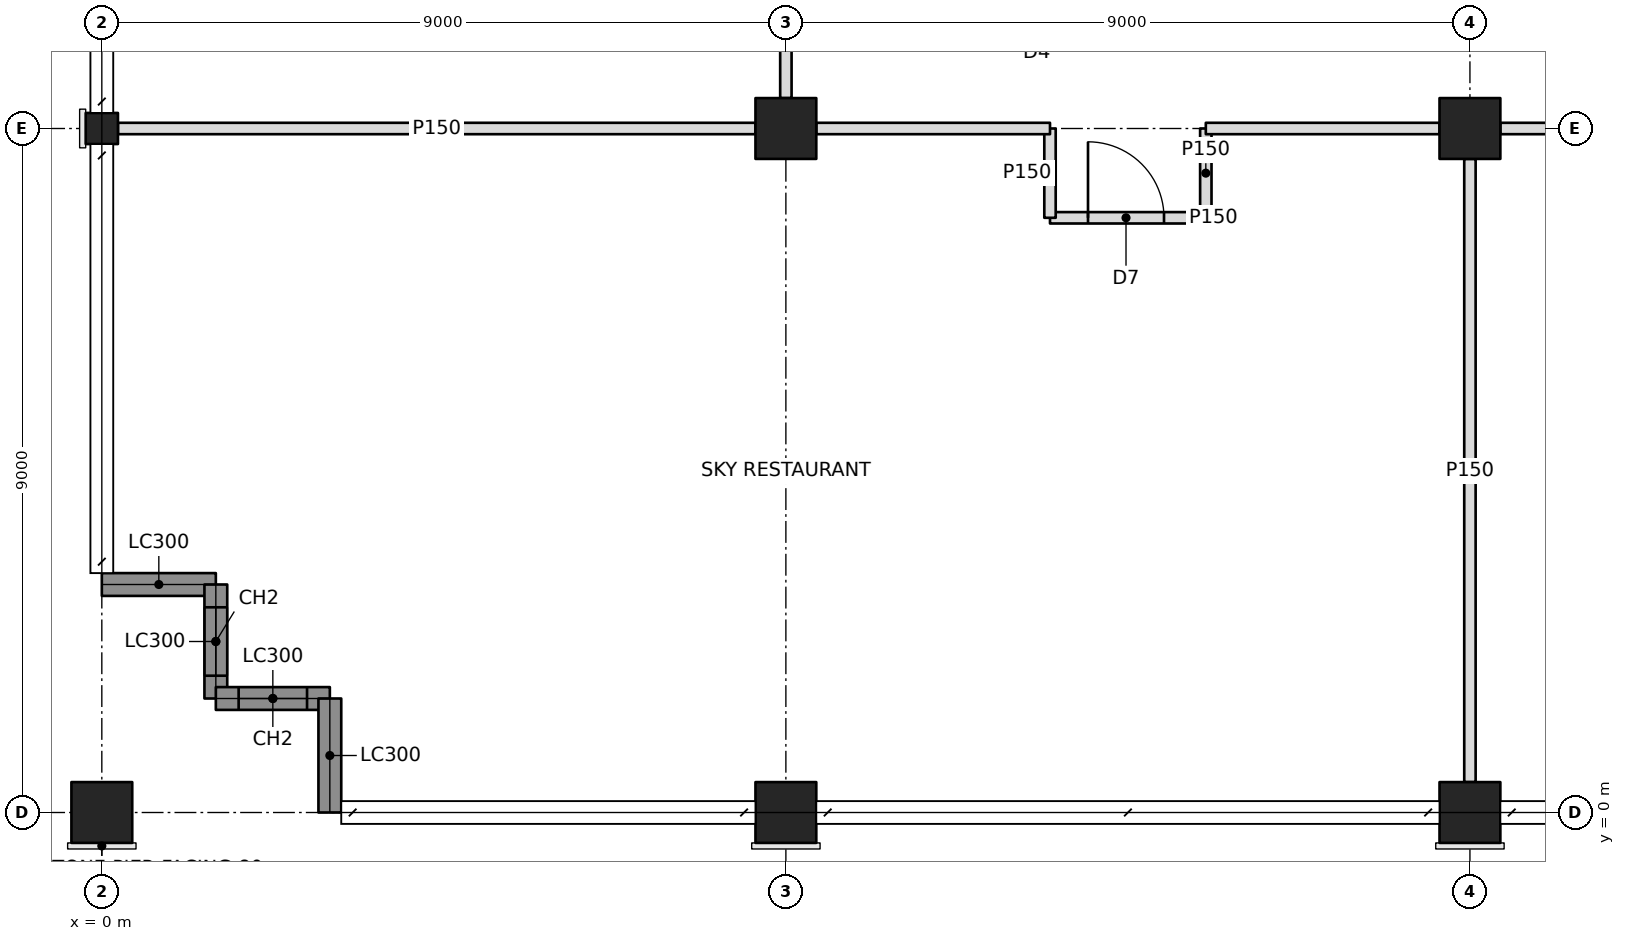
"""IFC4 building model, lengths in metres.
Left out: names, types, materials, properties, quantities, classifications, styles, units other than length and angle.
Written with IfcOpenShell. Run it as: python <this file> out.ifc"""

import sys

from ifc_helpers import new_model, si_unit, direction, frame, frame_2d, origin, origin_with_axes, origin_2d, place, context, subcontext, project, spatial, rectangle, hollow_rectangle, i_section, extrude, element, fill, save


model = new_model("IFC4")
c1 = context("Model", 3, precision=1e-05, world=origin(), true_north=direction((0.0, 1.0)))
c2 = subcontext(c1, "Body", "Model", "MODEL_VIEW")
j1 = project(units=[si_unit("LENGTHUNIT", "METRE"), si_unit("PLANEANGLEUNIT", "RADIAN")], contexts=[c1])
p1 = place(None, origin())
s1 = spatial("IfcSite", under=j1, at=p1, CompositionType="ELEMENT")
p2 = place(p1, origin())
s2 = spatial("IfcBuilding", under=s1, at=p2, CompositionType="ELEMENT")
p3 = place(p2, frame((0.0, 0.0, 269.8)))
s3 = spatial("IfcBuildingStorey", under=s2, at=p3, CompositionType="ELEMENT", Elevation=269.8)
p4 = place(p3, origin_with_axes())
e1 = element("IfcColumn", 1, at=p4, inside=s3, PredefinedType="COLUMN", context=c2, shape_type="SweptSolid", body=[
    extrude(hollow_rectangle(XDim=0.8, YDim=0.8, WallThickness=0.025, at=origin_2d()), origin(), (0.0, 0.0, 1.0), 5.0),
])
p5 = place(p3, frame((0.0, 9.0, 0.0), z_axis=(0.0, 0.0, 1.0), x_axis=(0.0, 1.0, 0.0)))
e2 = element("IfcColumn", 2, at=p5, inside=s3, PredefinedType="COLUMN", context=c2, shape_type="SweptSolid", body=[
    extrude(i_section(OverallWidth=0.409, OverallDepth=0.424, WebThickness=0.033, FlangeThickness=0.052, at=origin_2d()), origin(), (0.0, 0.0, 1.0), 5.0),
])
for number, where, z_axis, x_axis in (
    (3, (9.0, 0.0, 0.0), (0.0, 0.0, 1.0), (1.0, 0.0, 0.0)),
    (4, (9.0, 9.0, 0.0), (0.0, 0.0, 1.0), (1.0, 0.0, 0.0)),
    (5, (18.0, 0.0, 0.0), (0.0, 0.0, 1.0), (1.0, 0.0, 0.0)),
    (6, (18.0, 9.0, 0.0), (0.0, 0.0, 1.0), (1.0, 0.0, 0.0)),
):
    element("IfcColumn", number, at=place(p3, frame(where, z_axis=z_axis, x_axis=x_axis)), inside=s3, PredefinedType="COLUMN", context=c2, shape_type="SweptSolid", body=[
        extrude(hollow_rectangle(XDim=0.8, YDim=0.8, WallThickness=0.025, at=origin_2d()), origin(), (0.0, 0.0, 1.0), 5.0),
    ])
p6 = place(p3, frame((0.0, 3.0, 0.0), z_axis=(0.0, 0.0, 1.0), x_axis=(1.0, 0.0, 0.0)))
e7 = element("IfcWall", 7, at=p6, inside=s3, PredefinedType="SOLIDWALL", context=c2, shape_type="SweptSolid", body=[
    extrude(rectangle(XDim=1.5, YDim=0.3, at=frame_2d((0.75, 0.0))), origin(), (0.0, 0.0, 1.0), 3.97),
])
p7 = place(p3, frame((1.5, 3.0, 0.0), z_axis=(0.0, 0.0, 1.0), x_axis=(0.0, -1.0, 0.0)))
e8 = element("IfcWall", 8, at=p7, inside=s3, PredefinedType="SOLIDWALL", context=c2, shape_type="SweptSolid", body=[
    extrude(rectangle(XDim=1.5, YDim=0.3, at=frame_2d((0.75, 0.0))), origin(), (0.0, 0.0, 1.0), 4.75),
])
p8 = place(p7, frame((0.3, 0.0, 0.6)))
e9 = element("IfcOpeningElement", 9, at=p8, cuts=e8, PredefinedType="OPENING", context=c2, shape_type="SweptSolid", body=[
    extrude(rectangle(XDim=0.9, YDim=2.2, at=frame_2d((0.45, 1.1))), frame((0.0, 0.16, 0.0), z_axis=(0.0, -1.0, 0.0), x_axis=(1.0, 0.0, 0.0)), (0.0, 0.0, 1.0), 0.32),
])
p9 = place(p3, frame((1.5, 1.5, 0.0), z_axis=(0.0, 0.0, 1.0), x_axis=(1.0, 0.0, 0.0)))
e10 = element("IfcWall", 10, at=p9, inside=s3, PredefinedType="SOLIDWALL", context=c2, shape_type="SweptSolid", body=[
    extrude(rectangle(XDim=1.5, YDim=0.3, at=frame_2d((0.75, 0.0))), origin(), (0.0, 0.0, 1.0), 4.142),
])
p10 = place(p9, frame((0.3, 0.0, 0.6)))
e11 = element("IfcOpeningElement", 11, at=p10, cuts=e10, PredefinedType="OPENING", context=c2, shape_type="SweptSolid", body=[
    extrude(rectangle(XDim=0.9, YDim=2.2, at=frame_2d((0.45, 1.1))), frame((0.0, 0.16, 0.0), z_axis=(0.0, -1.0, 0.0), x_axis=(1.0, 0.0, 0.0)), (0.0, 0.0, 1.0), 0.32),
])
p11 = place(p3, frame((3.0, 1.5, 0.0), z_axis=(0.0, 0.0, 1.0), x_axis=(0.0, -1.0, 0.0)))
e12 = element("IfcWall", 12, at=p11, inside=s3, PredefinedType="SOLIDWALL", context=c2, shape_type="SweptSolid", body=[
    extrude(rectangle(XDim=1.5, YDim=0.3, at=frame_2d((0.75, 0.0))), origin(), (0.0, 0.0, 1.0), 3.97),
])
p12 = place(p3, frame((0.212, 9.0, 0.0), z_axis=(0.0, 0.0, 1.0), x_axis=(1.0, 0.0, 0.0)))
e13 = element("IfcWall", 13, at=p12, inside=s3, PredefinedType="PARTITIONING", context=c2, shape_type="SweptSolid", body=[
    extrude(rectangle(XDim=8.388, YDim=0.15, at=frame_2d((4.194, 0.0))), origin(), (0.0, 0.0, 1.0), 3.802),
])
p13 = place(p3, frame((9.4, 9.0, 0.0), z_axis=(0.0, 0.0, 1.0), x_axis=(1.0, 0.0, 0.0)))
e14 = element("IfcWall", 14, at=p13, inside=s3, PredefinedType="PARTITIONING", context=c2, shape_type="SweptSolid", body=[
    extrude(rectangle(XDim=3.075, YDim=0.15, at=frame_2d((1.538, 0.0))), origin(), (0.0, 0.0, 1.0), 3.802),
])
p14 = place(p3, frame((9.0, 13.5, 0.0), z_axis=(0.0, 0.0, 1.0), x_axis=(0.0, -1.0, 0.0)))
e15 = element("IfcWall", 15, at=p14, inside=s3, PredefinedType="PARTITIONING", context=c2, shape_type="SweptSolid", body=[
    extrude(rectangle(XDim=4.1, YDim=0.15, at=frame_2d((2.05, 0.0))), origin(), (0.0, 0.0, 1.0), 3.802),
])
p15 = place(p14, frame((1.5, 0.0, 0.0)))
e16 = element("IfcOpeningElement", 16, at=p15, cuts=e15, PredefinedType="OPENING", context=c2, shape_type="SweptSolid", body=[
    extrude(rectangle(XDim=1.0, YDim=2.1, at=frame_2d((0.5, 1.05))), frame((0.0, 0.085, 0.0), z_axis=(0.0, -1.0, 0.0), x_axis=(1.0, 0.0, 0.0)), (0.0, 0.0, 1.0), 0.17),
])
p16 = place(p3, frame((18.0, 8.6, 0.0), z_axis=(0.0, 0.0, 1.0), x_axis=(0.0, -1.0, 0.0)))
e17 = element("IfcWall", 17, at=p16, inside=s3, PredefinedType="PARTITIONING", context=c2, shape_type="SweptSolid", body=[
    extrude(rectangle(XDim=8.2, YDim=0.15, at=frame_2d((4.1, 0.0))), origin(), (0.0, 0.0, 1.0), 3.802),
])
p17 = place(p3, frame((18.4, 9.0, 0.0), z_axis=(0.0, 0.0, 1.0), x_axis=(1.0, 0.0, 0.0)))
e18 = element("IfcWall", 18, at=p17, inside=s3, PredefinedType="PARTITIONING", context=c2, shape_type="SweptSolid", body=[
    extrude(rectangle(XDim=5.775, YDim=0.15, at=frame_2d((2.888, 0.0))), origin(), (0.0, 0.0, 1.0), 3.802),
])
p18 = place(p3, frame((14.525, 9.0, 0.0), z_axis=(0.0, 0.0, 1.0), x_axis=(1.0, 0.0, 0.0)))
e19 = element("IfcWall", 19, at=p18, inside=s3, PredefinedType="PARTITIONING", context=c2, shape_type="SweptSolid", body=[
    extrude(rectangle(XDim=3.075, YDim=0.15, at=frame_2d((1.538, 0.0))), origin(), (0.0, 0.0, 1.0), 3.802),
])
for number, where, z_axis, x_axis in (
    (20, (12.475, 9.0, 0.0), (0.0, 0.0, 1.0), (0.0, -1.0, 0.0)),
    (21, (14.525, 9.0, 0.0), (0.0, 0.0, 1.0), (0.0, -1.0, 0.0)),
):
    element("IfcWall", number, at=place(p3, frame(where, z_axis=z_axis, x_axis=x_axis)), inside=s3, PredefinedType="PARTITIONING", context=c2, shape_type="SweptSolid", body=[
        extrude(rectangle(XDim=1.175, YDim=0.15, at=frame_2d((0.587, 0.0))), origin(), (0.0, 0.0, 1.0), 3.802),
    ])
p19 = place(p3, frame((12.475, 7.825, 0.0), z_axis=(0.0, 0.0, 1.0), x_axis=(1.0, 0.0, 0.0)))
e22 = element("IfcWall", 22, at=p19, inside=s3, PredefinedType="PARTITIONING", context=c2, shape_type="SweptSolid", body=[
    extrude(rectangle(XDim=2.05, YDim=0.15, at=frame_2d((1.025, 0.0))), origin(), (0.0, 0.0, 1.0), 4.75),
])
p20 = place(p19, frame((0.5, 0.0, 0.0)))
e23 = element("IfcOpeningElement", 23, at=p20, cuts=e22, PredefinedType="OPENING", context=c2, shape_type="SweptSolid", body=[
    extrude(rectangle(XDim=1.0, YDim=2.1, at=frame_2d((0.5, 1.05))), frame((0.0, 0.085, 0.0), z_axis=(0.0, -1.0, 0.0), x_axis=(1.0, 0.0, 0.0)), (0.0, 0.0, 1.0), 0.17),
])
p21 = place(p8, origin())
e24 = element("IfcWindow", 24, at=p21, inside=s3, PartitioningType="SINGLE_PANEL", PredefinedType="WINDOW", context=c2, shape_type="SweptSolid", body=[
    extrude(rectangle(XDim=0.9, YDim=2.2, at=frame_2d((0.45, 1.1))), frame((0.0, 0.03, 0.0), z_axis=(0.0, -1.0, 0.0), x_axis=(1.0, 0.0, 0.0)), (0.0, 0.0, 1.0), 0.06),
])
fill(e9, e24)
p22 = place(p10, origin())
e25 = element("IfcWindow", 25, at=p22, inside=s3, PartitioningType="SINGLE_PANEL", PredefinedType="WINDOW", context=c2, shape_type="SweptSolid", body=[
    extrude(rectangle(XDim=0.9, YDim=2.2, at=frame_2d((0.45, 1.1))), frame((0.0, 0.03, 0.0), z_axis=(0.0, -1.0, 0.0), x_axis=(1.0, 0.0, 0.0)), (0.0, 0.0, 1.0), 0.06),
])
fill(e11, e25)
p23 = place(p20, origin())
e26 = element("IfcDoor", 26, at=p23, inside=s3, OperationType="SINGLE_SWING_LEFT", PredefinedType="DOOR", context=c2, shape_type="SweptSolid", body=[
    extrude(rectangle(XDim=1.0, YDim=2.1, at=frame_2d((0.5, 1.05))), frame((0.0, 0.025, 0.0), z_axis=(0.0, -1.0, 0.0), x_axis=(1.0, 0.0, 0.0)), (0.0, 0.0, 1.0), 0.05),
])
fill(e23, e26)
save(model, sys.argv[1])
